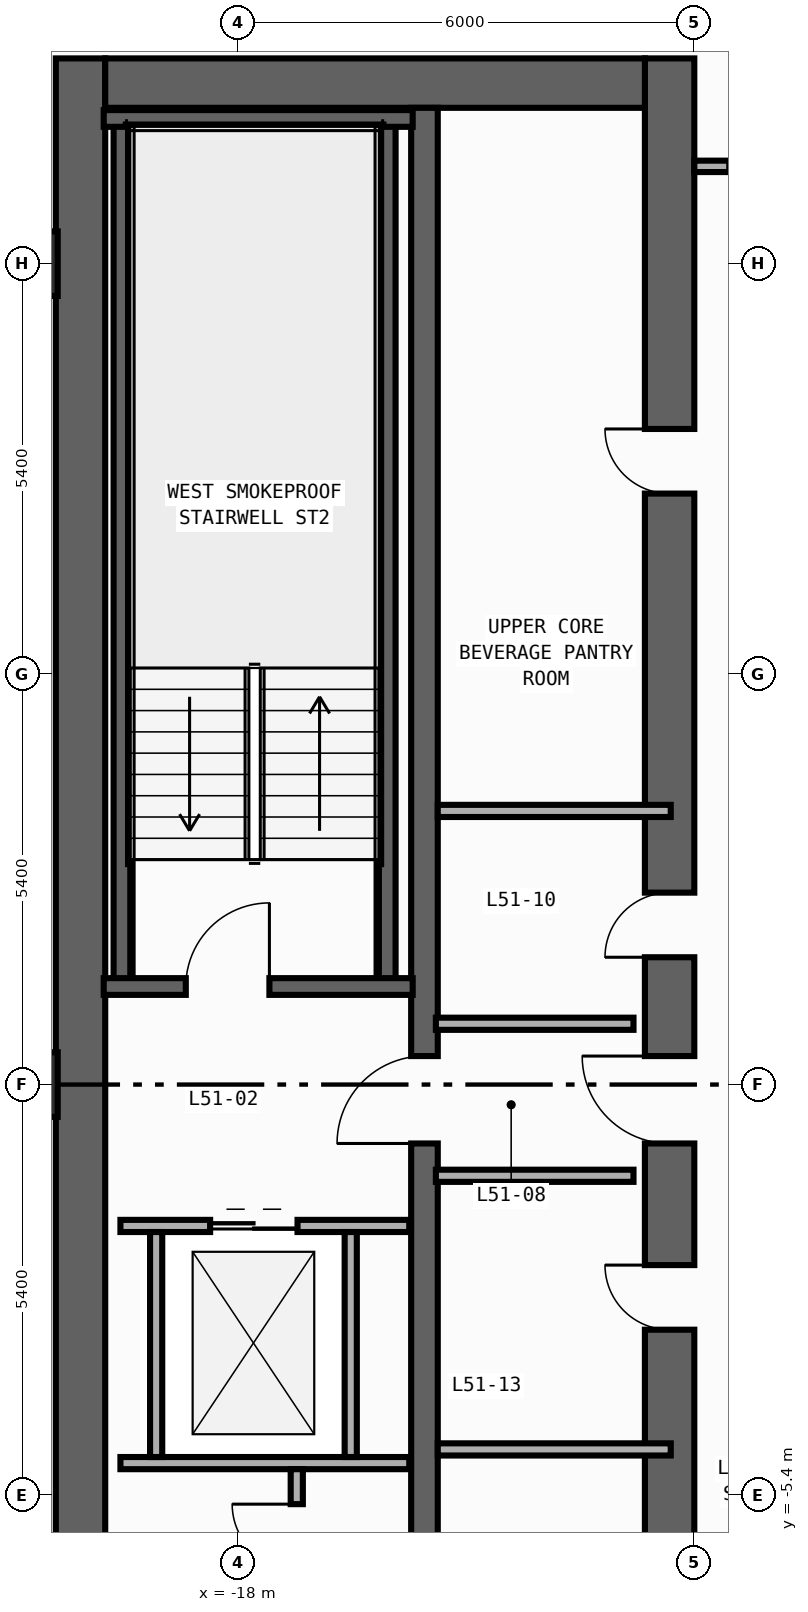
"""IFC4 building model, lengths in metres.
Left out: names, types, materials, properties, quantities, classifications, styles, units other than length and angle.
Written with IfcOpenShell. Run it as: python <this file> out.ifc"""

import sys

from ifc_helpers import new_model, si_unit, direction, frame, frame_2d, origin, origin_2d, place, context, subcontext, project, spatial, rectangle, extrude, element, fill, save


model = new_model("IFC4")
c1 = context("Model", 3, precision=1e-05, world=origin(), true_north=direction((0.0, 1.0)))
c2 = subcontext(c1, "Body", "Model", "MODEL_VIEW")
j1 = project(units=[si_unit("LENGTHUNIT", "METRE"), si_unit("PLANEANGLEUNIT", "RADIAN")], contexts=[c1])
p1 = place(None, origin())
s1 = spatial("IfcSite", under=j1, at=p1, CompositionType="ELEMENT")
p2 = place(p1, origin())
s2 = spatial("IfcBuilding", under=s1, at=p2, CompositionType="ELEMENT")
p3 = place(p2, frame((0.0, 0.0, 222.4)))
s3 = spatial("IfcBuildingStorey", under=s2, at=p3, CompositionType="ELEMENT", Elevation=222.4)
p4 = place(p3, frame((-20.075, -13.5, 0.0), z_axis=(0.0, 0.0, 1.0), x_axis=(0.0, 1.0, 0.0)))
e1 = element("IfcWall", 1, at=p4, inside=s3, PredefinedType="SHEAR", context=c2, shape_type="SweptSolid", body=[
    extrude(rectangle(XDim=27.0, YDim=0.65, at=frame_2d((13.5, 0.0))), origin(), (0.0, 0.0, 1.0), 3.34),
])
p5 = place(p3, frame((-12.325, -13.5, 0.0), z_axis=(0.0, 0.0, 1.0), x_axis=(0.0, 1.0, 0.0)))
e2 = element("IfcWall", 2, at=p5, inside=s3, PredefinedType="SHEAR", context=c2, shape_type="SweptSolid", body=[
    extrude(rectangle(XDim=27.0, YDim=0.65, at=frame_2d((13.5, 0.0))), origin(), (0.0, 0.0, 1.0), 3.34),
])
p6 = place(p5, frame((15.175, 0.0, 0.0)))
e3 = element("IfcOpeningElement", 3, at=p6, cuts=e2, PredefinedType="OPENING", context=c2, shape_type="SweptSolid", body=[
    extrude(rectangle(XDim=0.85, YDim=2.1, at=frame_2d((0.425, 1.05))), frame((0.0, 0.335, 0.0), z_axis=(0.0, -1.0, 0.0), x_axis=(1.0, 0.0, 0.0)), (0.0, 0.0, 1.0), 0.67),
])
p7 = place(p5, frame((21.275, 0.0, 0.0)))
e4 = element("IfcOpeningElement", 4, at=p7, cuts=e2, PredefinedType="OPENING", context=c2, shape_type="SweptSolid", body=[
    extrude(rectangle(XDim=0.85, YDim=2.1, at=frame_2d((0.425, 1.05))), frame((0.0, 0.335, 0.0), z_axis=(0.0, -1.0, 0.0), x_axis=(1.0, 0.0, 0.0)), (0.0, 0.0, 1.0), 0.67),
])
p8 = place(p5, frame((4.275, 0.0, 0.0)))
e5 = element("IfcOpeningElement", 5, at=p8, cuts=e2, PredefinedType="OPENING", context=c2, shape_type="SweptSolid", body=[
    extrude(rectangle(XDim=0.85, YDim=2.1, at=frame_2d((0.425, 1.05))), frame((0.0, 0.335, 0.0), z_axis=(0.0, -1.0, 0.0), x_axis=(1.0, 0.0, 0.0)), (0.0, 0.0, 1.0), 0.67),
])
p9 = place(p5, frame((10.275, 0.0, 0.0)))
e6 = element("IfcOpeningElement", 6, at=p9, cuts=e2, PredefinedType="OPENING", context=c2, shape_type="SweptSolid", body=[
    extrude(rectangle(XDim=0.85, YDim=2.1, at=frame_2d((0.425, 1.05))), frame((0.0, 0.335, 0.0), z_axis=(0.0, -1.0, 0.0), x_axis=(1.0, 0.0, 0.0)), (0.0, 0.0, 1.0), 0.67),
])
p10 = place(p5, frame((12.725, 0.0, 0.0)))
e7 = element("IfcOpeningElement", 7, at=p10, cuts=e2, PredefinedType="OPENING", context=c2, shape_type="SweptSolid", body=[
    extrude(rectangle(XDim=1.15, YDim=2.2, at=frame_2d((0.575, 1.1))), frame((0.0, 0.335, 0.0), z_axis=(0.0, -1.0, 0.0), x_axis=(1.0, 0.0, 0.0)), (0.0, 0.0, 1.0), 0.67),
])
p11 = place(p5, frame((1.625, 0.0, 0.0)))
e8 = element("IfcOpeningElement", 8, at=p11, cuts=e2, PredefinedType="OPENING", context=c2, shape_type="SweptSolid", body=[
    extrude(rectangle(XDim=0.85, YDim=2.1, at=frame_2d((0.425, 1.05))), frame((0.0, 0.335, 0.0), z_axis=(0.0, -1.0, 0.0), x_axis=(1.0, 0.0, 0.0)), (0.0, 0.0, 1.0), 0.67),
])
p12 = place(p3, frame((-19.75, 13.175, 0.0), z_axis=(0.0, 0.0, 1.0), x_axis=(1.0, 0.0, 0.0)))
e9 = element("IfcWall", 9, at=p12, inside=s3, PredefinedType="SHEAR", context=c2, shape_type="SweptSolid", body=[
    extrude(rectangle(XDim=7.1, YDim=0.65, at=frame_2d((3.55, 0.0))), origin(), (0.0, 0.0, 1.0), 3.34),
])
p13 = place(p3, frame((-15.55, -12.85, 0.0), z_axis=(0.0, 0.0, 1.0), x_axis=(0.0, 1.0, 0.0)))
e10 = element("IfcWall", 10, at=p13, inside=s3, PredefinedType="SHEAR", context=c2, shape_type="SweptSolid", body=[
    extrude(rectangle(XDim=25.7, YDim=0.35, at=frame_2d((12.85, 0.0))), origin(), (0.0, 0.0, 1.0), 3.34),
])
p14 = place(p13, frame((12.075, 0.0, 0.0)))
e11 = element("IfcOpeningElement", 11, at=p14, cuts=e10, PredefinedType="OPENING", context=c2, shape_type="SweptSolid", body=[
    extrude(rectangle(XDim=1.15, YDim=2.2, at=frame_2d((0.575, 1.1))), frame((0.0, 0.185, 0.0), z_axis=(0.0, -1.0, 0.0), x_axis=(1.0, 0.0, 0.0)), (0.0, 0.0, 1.0), 0.37),
])
p15 = place(p13, frame((0.975, 0.0, 0.0)))
e12 = element("IfcOpeningElement", 12, at=p15, cuts=e10, PredefinedType="OPENING", context=c2, shape_type="SweptSolid", body=[
    extrude(rectangle(XDim=0.85, YDim=2.1, at=frame_2d((0.425, 1.05))), frame((0.0, 0.185, 0.0), z_axis=(0.0, -1.0, 0.0), x_axis=(1.0, 0.0, 0.0)), (0.0, 0.0, 1.0), 0.37),
])
for number, where, z_axis, x_axis in (
    (13, (-16.04, 1.29, 0.0), (0.0, 0.0, 1.0), (0.0, 1.0, 0.0)),
    (14, (-19.53, 1.29, 0.0), (0.0, 0.0, 1.0), (0.0, 1.0, 0.0)),
):
    element("IfcWall", number, at=place(p3, frame(where, z_axis=z_axis, x_axis=x_axis)), inside=s3, PredefinedType="SHEAR", context=c2, shape_type="SweptSolid", body=[
        extrude(rectangle(XDim=11.42, YDim=0.22, at=frame_2d((5.71, 0.0))), origin(), (0.0, 0.0, 1.0), 3.34),
    ])
p16 = place(p3, frame((-19.77, 12.71, 0.0), z_axis=(0.0, 0.0, 1.0), x_axis=(1.0, 0.0, 0.0)))
e15 = element("IfcWall", 15, at=p16, inside=s3, PredefinedType="SHEAR", context=c2, shape_type="SweptSolid", body=[
    extrude(rectangle(XDim=4.065, YDim=0.22, at=frame_2d((2.032, 0.0))), origin(), (0.0, 0.0, 1.0), 3.34),
])
p17 = place(p3, frame((-19.77, 1.29, 0.0), z_axis=(0.0, 0.0, 1.0), x_axis=(1.0, 0.0, 0.0)))
e16 = element("IfcWall", 16, at=p17, inside=s3, PredefinedType="SHEAR", context=c2, shape_type="SweptSolid", body=[
    extrude(rectangle(XDim=4.065, YDim=0.22, at=frame_2d((2.032, 0.0))), origin(), (0.0, 0.0, 1.0), 3.34),
])
p18 = place(p17, frame((1.08, 0.0, 0.0)))
e17 = element("IfcOpeningElement", 17, at=p18, cuts=e16, PredefinedType="OPENING", context=c2, shape_type="SweptSolid", body=[
    extrude(rectangle(XDim=1.1, YDim=2.2, at=frame_2d((0.55, 1.1))), frame((0.0, 0.12, 0.0), z_axis=(0.0, -1.0, 0.0), x_axis=(1.0, 0.0, 0.0)), (0.0, 0.0, 1.0), 0.24),
])
for number, where, z_axis, x_axis in (
    (18, (-20.8, 0.0, 0.0), (0.0, 0.0, 1.0), (1.0, 0.0, 0.0)),
    (19, (-20.8, 10.8, 0.0), (0.0, 0.0, 1.0), (1.0, 0.0, 0.0)),
):
    element("IfcColumn", number, at=place(p3, frame(where, z_axis=z_axis, x_axis=x_axis)), inside=s3, PredefinedType="COLUMN", context=c2, shape_type="SweptSolid", body=[
        extrude(rectangle(XDim=0.85, YDim=0.85, at=origin_2d()), origin(), (0.0, 0.0, 1.0), 3.6),
    ])
p19 = place(p3, frame((-19.55, -1.86, 0.0), z_axis=(0.0, 0.0, 1.0), x_axis=(1.0, 0.0, 0.0)))
e20 = element("IfcWall", 20, at=p19, inside=s3, PredefinedType="STANDARD", context=c2, shape_type="SweptSolid", body=[
    extrude(rectangle(XDim=3.8, YDim=0.16, at=frame_2d((1.9, 0.0))), origin(), (0.0, 0.0, 1.0), 3.34),
])
p20 = place(p19, frame((1.18, 0.0, 0.0)))
e21 = element("IfcOpeningElement", 21, at=p20, cuts=e20, PredefinedType="OPENING", context=c2, shape_type="SweptSolid", body=[
    extrude(rectangle(XDim=1.15, YDim=2.2, at=frame_2d((0.575, 1.1))), frame((0.0, 0.09, 0.0), z_axis=(0.0, -1.0, 0.0), x_axis=(1.0, 0.0, 0.0)), (0.0, 0.0, 1.0), 0.18),
])
p21 = place(p3, frame((-19.55, -4.98, 0.0), z_axis=(0.0, 0.0, 1.0), x_axis=(1.0, 0.0, 0.0)))
e22 = element("IfcWall", 22, at=p21, inside=s3, PredefinedType="STANDARD", context=c2, shape_type="SweptSolid", body=[
    extrude(rectangle(XDim=3.8, YDim=0.16, at=frame_2d((1.9, 0.0))), origin(), (0.0, 0.0, 1.0), 3.34),
])
for number, where, z_axis, x_axis in (
    (23, (-19.08, -4.9, 0.0), (0.0, 0.0, 1.0), (0.0, 1.0, 0.0)),
    (24, (-16.52, -4.9, 0.0), (0.0, 0.0, 1.0), (0.0, 1.0, 0.0)),
):
    element("IfcWall", number, at=place(p3, frame(where, z_axis=z_axis, x_axis=x_axis)), inside=s3, PredefinedType="STANDARD", context=c2, shape_type="SweptSolid", body=[
        extrude(rectangle(XDim=2.96, YDim=0.16, at=frame_2d((1.48, 0.0))), origin(), (0.0, 0.0, 1.0), 3.34),
    ])
for number, where, z_axis, x_axis in (
    (25, (-15.4, 0.8, 0.0), (0.0, 0.0, 1.0), (1.0, 0.0, 0.0)),
    (26, (-15.4, -1.2, 0.0), (0.0, 0.0, 1.0), (1.0, 0.0, 0.0)),
):
    element("IfcWall", number, at=place(p3, frame(where, z_axis=z_axis, x_axis=x_axis)), inside=s3, PredefinedType="STANDARD", context=c2, shape_type="SweptSolid", body=[
        extrude(rectangle(XDim=2.6, YDim=0.16, at=frame_2d((1.3, 0.0))), origin(), (0.0, 0.0, 1.0), 3.34),
    ])
p22 = place(p3, frame((-17.23, -7.67, 0.0), z_axis=(0.0, 0.0, 1.0), x_axis=(0.0, 1.0, 0.0)))
e27 = element("IfcWall", 27, at=p22, inside=s3, PredefinedType="PARTITIONING", context=c2, shape_type="SweptSolid", body=[
    extrude(rectangle(XDim=2.61, YDim=0.16, at=frame_2d((1.305, 0.0))), origin(), (0.0, 0.0, 1.0), 3.34),
])
p23 = place(p22, frame((1.3, 0.0, 0.0)))
e28 = element("IfcOpeningElement", 28, at=p23, cuts=e27, PredefinedType="OPENING", context=c2, shape_type="SweptSolid", body=[
    extrude(rectangle(XDim=0.85, YDim=2.1, at=frame_2d((0.425, 1.05))), frame((0.0, 0.09, 0.0), z_axis=(0.0, -1.0, 0.0), x_axis=(1.0, 0.0, 0.0)), (0.0, 0.0, 1.0), 0.18),
])
for number, where, z_axis, x_axis in (
    (29, (-15.375, 3.6, 0.0), (0.0, 0.0, 1.0), (1.0, 0.0, 0.0)),
    (30, (-15.375, -4.8, 0.0), (0.0, 0.0, 1.0), (1.0, 0.0, 0.0)),
):
    element("IfcWall", number, at=place(p3, frame(where, z_axis=z_axis, x_axis=x_axis)), inside=s3, PredefinedType="PARTITIONING", context=c2, shape_type="SweptSolid", body=[
        extrude(rectangle(XDim=3.065, YDim=0.16, at=frame_2d((1.532, 0.0))), origin(), (0.0, 0.0, 1.0), 3.34),
    ])
p24 = place(p3, frame((-12.0, 12.08, 0.0), z_axis=(0.0, 0.0, 1.0), x_axis=(1.0, 0.0, 0.0)))
e31 = element("IfcWall", 31, at=p24, inside=s3, PredefinedType="PARTITIONING", context=c2, shape_type="SweptSolid", body=[
    extrude(rectangle(XDim=2.84, YDim=0.15, at=frame_2d((1.42, 0.0))), origin(), (0.0, 0.0, 1.0), 3.34),
])
p25 = place(p24, frame((0.46, 0.0, 0.0)))
e32 = element("IfcOpeningElement", 32, at=p25, cuts=e31, PredefinedType="OPENING", context=c2, shape_type="SweptSolid", body=[
    extrude(rectangle(XDim=0.9, YDim=2.15, at=frame_2d((0.45, 1.075))), frame((0.0, 0.085, 0.0), z_axis=(0.0, -1.0, 0.0), x_axis=(1.0, 0.0, 0.0)), (0.0, 0.0, 1.0), 0.17),
])
p26 = place(p18, origin())
e33 = element("IfcDoor", 33, at=p26, inside=s3, OperationType="SINGLE_SWING_RIGHT", PredefinedType="DOOR", context=c2, shape_type="SweptSolid", body=[
    extrude(rectangle(XDim=1.1, YDim=2.2, at=frame_2d((0.55, 1.1))), frame((0.0, 0.025, 0.0), z_axis=(0.0, -1.0, 0.0), x_axis=(1.0, 0.0, 0.0)), (0.0, 0.0, 1.0), 0.05),
])
fill(e17, e33)
p27 = place(p6, origin())
e34 = element("IfcDoor", 34, at=p27, inside=s3, OperationType="SINGLE_SWING_LEFT", PredefinedType="DOOR", context=c2, shape_type="SweptSolid", body=[
    extrude(rectangle(XDim=0.85, YDim=2.1, at=frame_2d((0.425, 1.05))), frame((0.0, 0.025, 0.0), z_axis=(0.0, -1.0, 0.0), x_axis=(1.0, 0.0, 0.0)), (0.0, 0.0, 1.0), 0.05),
])
fill(e3, e34)
p28 = place(p7, origin())
e35 = element("IfcDoor", 35, at=p28, inside=s3, OperationType="SINGLE_SWING_RIGHT", PredefinedType="DOOR", context=c2, shape_type="SweptSolid", body=[
    extrude(rectangle(XDim=0.85, YDim=2.1, at=frame_2d((0.425, 1.05))), frame((0.0, 0.025, 0.0), z_axis=(0.0, -1.0, 0.0), x_axis=(1.0, 0.0, 0.0)), (0.0, 0.0, 1.0), 0.05),
])
fill(e4, e35)
p29 = place(p9, origin())
e36 = element("IfcDoor", 36, at=p29, inside=s3, OperationType="SINGLE_SWING_RIGHT", PredefinedType="DOOR", context=c2, shape_type="SweptSolid", body=[
    extrude(rectangle(XDim=0.85, YDim=2.1, at=frame_2d((0.425, 1.05))), frame((0.0, 0.025, 0.0), z_axis=(0.0, -1.0, 0.0), x_axis=(1.0, 0.0, 0.0)), (0.0, 0.0, 1.0), 0.05),
])
fill(e6, e36)
p30 = place(p10, origin())
e37 = element("IfcDoor", 37, at=p30, inside=s3, OperationType="SINGLE_SWING_RIGHT", PredefinedType="DOOR", context=c2, shape_type="SweptSolid", body=[
    extrude(rectangle(XDim=1.15, YDim=2.2, at=frame_2d((0.575, 1.1))), frame((0.0, 0.025, 0.0), z_axis=(0.0, -1.0, 0.0), x_axis=(1.0, 0.0, 0.0)), (0.0, 0.0, 1.0), 0.05),
])
fill(e7, e37)
p31 = place(p14, origin())
e38 = element("IfcDoor", 38, at=p31, inside=s3, OperationType="SINGLE_SWING_LEFT", PredefinedType="DOOR", context=c2, shape_type="SweptSolid", body=[
    extrude(rectangle(XDim=1.15, YDim=2.2, at=frame_2d((0.575, 1.1))), frame((0.0, 0.025, 0.0), z_axis=(0.0, -1.0, 0.0), x_axis=(1.0, 0.0, 0.0)), (0.0, 0.0, 1.0), 0.05),
])
fill(e11, e38)
p32 = place(p20, origin())
e39 = element("IfcDoor", 39, at=p32, inside=s3, OperationType="DOUBLE_DOOR_SLIDING", PredefinedType="DOOR", context=c2, shape_type="SweptSolid", body=[
    extrude(rectangle(XDim=1.15, YDim=2.2, at=frame_2d((0.575, 1.1))), frame((0.0, 0.025, 0.0), z_axis=(0.0, -1.0, 0.0), x_axis=(1.0, 0.0, 0.0)), (0.0, 0.0, 1.0), 0.05),
])
fill(e21, e39)
p33 = place(p23, origin())
e40 = element("IfcDoor", 40, at=p33, inside=s3, OperationType="SINGLE_SWING_RIGHT", PredefinedType="DOOR", context=c2, shape_type="SweptSolid", body=[
    extrude(rectangle(XDim=0.85, YDim=2.1, at=frame_2d((0.425, 1.05))), frame((0.0, 0.025, 0.0), z_axis=(0.0, -1.0, 0.0), x_axis=(1.0, 0.0, 0.0)), (0.0, 0.0, 1.0), 0.05),
])
fill(e28, e40)
save(model, sys.argv[1])
